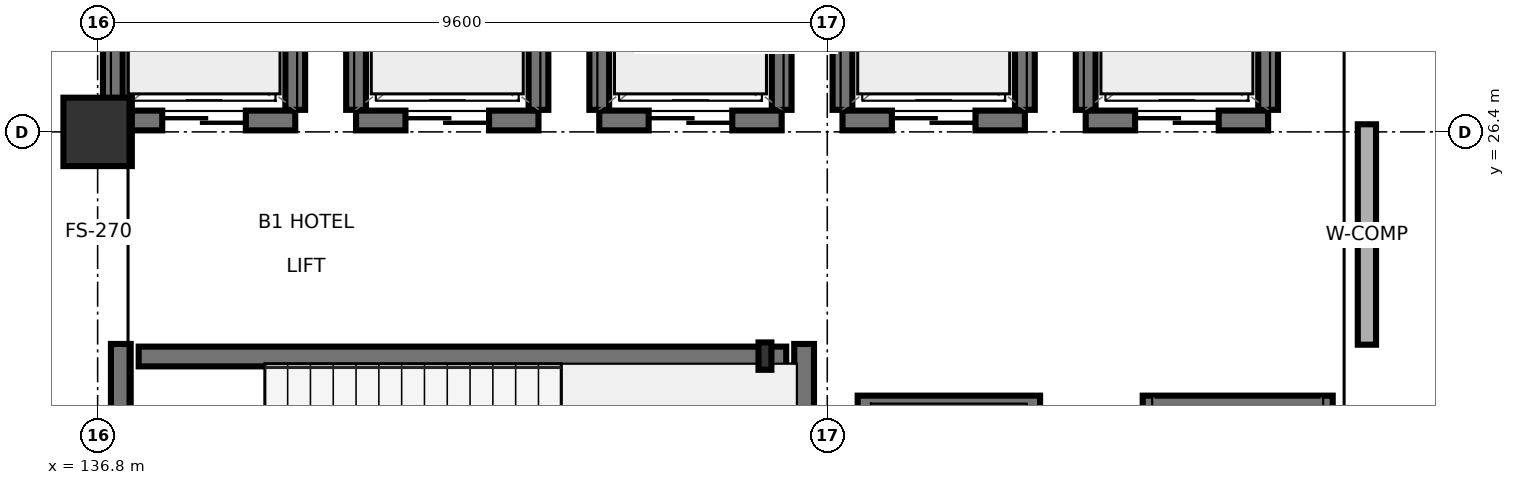
"""IFC4 building model, lengths in metres.
Left out: names, types, materials, properties, quantities, classifications, styles, units other than length and angle.
Written with IfcOpenShell. Run it as: python <this file> out.ifc"""

import sys

from ifc_helpers import new_model, si_unit, direction, frame, frame_2d, origin, origin_2d, place, context, subcontext, project, spatial, rectangle, i_section, extrude, element, fill, save


model = new_model("IFC4")
c1 = context("Model", 3, precision=1e-05, world=origin(), true_north=direction((0.0, 1.0)))
c2 = subcontext(c1, "Body", "Model", "MODEL_VIEW")
j1 = project(units=[si_unit("LENGTHUNIT", "METRE"), si_unit("PLANEANGLEUNIT", "RADIAN")], contexts=[c1])
p1 = place(None, origin())
s1 = spatial("IfcSite", under=j1, at=p1, CompositionType="ELEMENT")
p2 = place(p1, origin())
s2 = spatial("IfcBuilding", under=s1, at=p2, CompositionType="ELEMENT")
p3 = place(p2, frame((0.0, 0.0, -4.2)))
s3 = spatial("IfcBuildingStorey", under=s2, at=p3, CompositionType="ELEMENT", Elevation=-4.2)
p4 = place(p3, frame((136.8, 26.4, 0.0), z_axis=(0.0, 0.0, 1.0), x_axis=(1.0, 0.0, 0.0)))
e1 = element("IfcColumn", 1, at=p4, inside=s3, PredefinedType="COLUMN", context=c2, shape_type="SweptSolid", body=[
    extrude(rectangle(XDim=0.9, YDim=0.9, at=origin_2d()), origin(), (0.0, 0.0, 1.0), 4.2),
])
p5 = place(p3, frame((145.58, 23.45, 0.0), z_axis=(0.0, 0.0, 1.0), x_axis=(1.0, 0.0, 0.0)))
e2 = element("IfcColumn", 2, at=p5, inside=s3, PredefinedType="PILASTER", context=c2, shape_type="SweptSolid", body=[
    extrude(i_section(OverallWidth=0.17, OverallDepth=0.36, WebThickness=0.008, FlangeThickness=0.013, FilletRadius=0.018, at=origin_2d()), origin(), (0.0, 0.0, 1.0), 4.2),
])
p6 = place(p3, frame((137.105, 19.34, 0.0), z_axis=(0.0, 0.0, 1.0), x_axis=(0.0, 1.0, 0.0)))
e3 = element("IfcWall", 3, at=p6, inside=s3, PredefinedType="SHEAR", context=c2, shape_type="SweptSolid", body=[
    extrude(rectangle(XDim=4.27, YDim=0.26, at=frame_2d((2.135, 0.0))), origin(), (0.0, 0.0, 1.0), 3.88),
])
p7 = place(p6, frame((0.61, 0.0, 0.0)))
e4 = element("IfcOpeningElement", 4, at=p7, cuts=e3, PredefinedType="OPENING", context=c2, shape_type="SweptSolid", body=[
    extrude(rectangle(XDim=1.1, YDim=2.2, at=frame_2d((0.55, 1.1))), frame((0.0, 0.14, 0.0), z_axis=(0.0, -1.0, 0.0), x_axis=(1.0, 0.0, 0.0)), (0.0, 0.0, 1.0), 0.28),
])
p8 = place(p3, frame((146.095, 19.34, 0.0), z_axis=(0.0, 0.0, 1.0), x_axis=(0.0, 1.0, 0.0)))
e5 = element("IfcWall", 5, at=p8, inside=s3, PredefinedType="SHEAR", context=c2, shape_type="SweptSolid", body=[
    extrude(rectangle(XDim=4.27, YDim=0.26, at=frame_2d((2.135, 0.0))), origin(), (0.0, 0.0, 1.0), 3.88),
])
p9 = place(p3, frame((137.34, 23.445, 0.0), z_axis=(0.0, 0.0, 1.0), x_axis=(1.0, 0.0, 0.0)))
e6 = element("IfcWall", 6, at=p9, inside=s3, PredefinedType="SHEAR", context=c2, shape_type="SweptSolid", body=[
    extrude(rectangle(XDim=8.52, YDim=0.26, at=frame_2d((4.26, 0.0))), origin(), (0.0, 0.0, 1.0), 3.88),
])
p10 = place(p3, frame((137.0, 26.55, 0.0), z_axis=(0.0, 0.0, 1.0), x_axis=(1.0, 0.0, 0.0)))
e7 = element("IfcWall", 7, at=p10, inside=s3, PredefinedType="SHEAR", context=c2, shape_type="SweptSolid", body=[
    extrude(rectangle(XDim=2.4, YDim=0.26, at=frame_2d((1.2, 0.0))), origin(), (0.0, 0.0, 1.0), 3.315),
])
p11 = place(p10, frame((0.65, 0.0, 0.0)))
e8 = element("IfcOpeningElement", 8, at=p11, cuts=e7, PredefinedType="OPENING", context=c2, shape_type="SweptSolid", body=[
    extrude(rectangle(XDim=1.1, YDim=2.2, at=frame_2d((0.55, 1.1))), frame((0.0, 0.14, 0.0), z_axis=(0.0, -1.0, 0.0), x_axis=(1.0, 0.0, 0.0)), (0.0, 0.0, 1.0), 0.28),
])
for number, where, z_axis, x_axis in (
    (9, (137.0, 26.69, 0.0), (0.0, 0.0, 1.0), (0.0, 1.0, 0.0)),
    (10, (139.4, 26.69, 0.0), (0.0, 0.0, 1.0), (0.0, 1.0, 0.0)),
):
    element("IfcWall", number, at=place(p3, frame(where, z_axis=z_axis, x_axis=x_axis)), inside=s3, PredefinedType="SHEAR", context=c2, shape_type="SweptSolid", body=[
        extrude(rectangle(XDim=1.82, YDim=0.26, at=frame_2d((0.91, 0.0))), origin(), (0.0, 0.0, 1.0), 3.315),
    ])
p12 = place(p3, frame((140.2, 26.55, 0.0), z_axis=(0.0, 0.0, 1.0), x_axis=(1.0, 0.0, 0.0)))
e11 = element("IfcWall", 11, at=p12, inside=s3, PredefinedType="SHEAR", context=c2, shape_type="SweptSolid", body=[
    extrude(rectangle(XDim=2.4, YDim=0.26, at=frame_2d((1.2, 0.0))), origin(), (0.0, 0.0, 1.0), 3.88),
])
p13 = place(p12, frame((0.65, 0.0, 0.0)))
e12 = element("IfcOpeningElement", 12, at=p13, cuts=e11, PredefinedType="OPENING", context=c2, shape_type="SweptSolid", body=[
    extrude(rectangle(XDim=1.1, YDim=2.2, at=frame_2d((0.55, 1.1))), frame((0.0, 0.14, 0.0), z_axis=(0.0, -1.0, 0.0), x_axis=(1.0, 0.0, 0.0)), (0.0, 0.0, 1.0), 0.28),
])
for number, where, z_axis, x_axis in (
    (13, (140.2, 26.69, 0.0), (0.0, 0.0, 1.0), (0.0, 1.0, 0.0)),
    (14, (142.6, 26.69, 0.0), (0.0, 0.0, 1.0), (0.0, 1.0, 0.0)),
):
    element("IfcWall", number, at=place(p3, frame(where, z_axis=z_axis, x_axis=x_axis)), inside=s3, PredefinedType="SHEAR", context=c2, shape_type="SweptSolid", body=[
        extrude(rectangle(XDim=1.82, YDim=0.26, at=frame_2d((0.91, 0.0))), origin(), (0.0, 0.0, 1.0), 3.88),
    ])
p14 = place(p3, frame((143.4, 26.55, 0.0), z_axis=(0.0, 0.0, 1.0), x_axis=(1.0, 0.0, 0.0)))
e15 = element("IfcWall", 15, at=p14, inside=s3, PredefinedType="SHEAR", context=c2, shape_type="SweptSolid", body=[
    extrude(rectangle(XDim=2.4, YDim=0.26, at=frame_2d((1.2, 0.0))), origin(), (0.0, 0.0, 1.0), 3.88),
])
p15 = place(p14, frame((0.65, 0.0, 0.0)))
e16 = element("IfcOpeningElement", 16, at=p15, cuts=e15, PredefinedType="OPENING", context=c2, shape_type="SweptSolid", body=[
    extrude(rectangle(XDim=1.1, YDim=2.2, at=frame_2d((0.55, 1.1))), frame((0.0, 0.14, 0.0), z_axis=(0.0, -1.0, 0.0), x_axis=(1.0, 0.0, 0.0)), (0.0, 0.0, 1.0), 0.28),
])
for number, where, z_axis, x_axis in (
    (17, (143.4, 26.69, 0.0), (0.0, 0.0, 1.0), (0.0, 1.0, 0.0)),
    (18, (145.8, 26.69, 0.0), (0.0, 0.0, 1.0), (0.0, 1.0, 0.0)),
):
    element("IfcWall", number, at=place(p3, frame(where, z_axis=z_axis, x_axis=x_axis)), inside=s3, PredefinedType="SHEAR", context=c2, shape_type="SweptSolid", body=[
        extrude(rectangle(XDim=1.82, YDim=0.26, at=frame_2d((0.91, 0.0))), origin(), (0.0, 0.0, 1.0), 3.88),
    ])
p16 = place(p3, frame((146.6, 26.55, 0.0), z_axis=(0.0, 0.0, 1.0), x_axis=(1.0, 0.0, 0.0)))
e19 = element("IfcWall", 19, at=p16, inside=s3, PredefinedType="SHEAR", context=c2, shape_type="SweptSolid", body=[
    extrude(rectangle(XDim=2.4, YDim=0.26, at=frame_2d((1.2, 0.0))), origin(), (0.0, 0.0, 1.0), 3.88),
])
p17 = place(p16, frame((0.65, 0.0, 0.0)))
e20 = element("IfcOpeningElement", 20, at=p17, cuts=e19, PredefinedType="OPENING", context=c2, shape_type="SweptSolid", body=[
    extrude(rectangle(XDim=1.1, YDim=2.2, at=frame_2d((0.55, 1.1))), frame((0.0, 0.14, 0.0), z_axis=(0.0, -1.0, 0.0), x_axis=(1.0, 0.0, 0.0)), (0.0, 0.0, 1.0), 0.28),
])
for number, where, z_axis, x_axis in (
    (21, (146.6, 26.69, 0.0), (0.0, 0.0, 1.0), (0.0, 1.0, 0.0)),
    (22, (149.0, 26.69, 0.0), (0.0, 0.0, 1.0), (0.0, 1.0, 0.0)),
):
    element("IfcWall", number, at=place(p3, frame(where, z_axis=z_axis, x_axis=x_axis)), inside=s3, PredefinedType="SHEAR", context=c2, shape_type="SweptSolid", body=[
        extrude(rectangle(XDim=1.82, YDim=0.26, at=frame_2d((0.91, 0.0))), origin(), (0.0, 0.0, 1.0), 3.88),
    ])
p18 = place(p3, frame((149.8, 26.55, 0.0), z_axis=(0.0, 0.0, 1.0), x_axis=(1.0, 0.0, 0.0)))
e23 = element("IfcWall", 23, at=p18, inside=s3, PredefinedType="SHEAR", context=c2, shape_type="SweptSolid", body=[
    extrude(rectangle(XDim=2.4, YDim=0.26, at=frame_2d((1.2, 0.0))), origin(), (0.0, 0.0, 1.0), 3.88),
])
p19 = place(p18, frame((0.65, 0.0, 0.0)))
e24 = element("IfcOpeningElement", 24, at=p19, cuts=e23, PredefinedType="OPENING", context=c2, shape_type="SweptSolid", body=[
    extrude(rectangle(XDim=1.1, YDim=2.2, at=frame_2d((0.55, 1.1))), frame((0.0, 0.14, 0.0), z_axis=(0.0, -1.0, 0.0), x_axis=(1.0, 0.0, 0.0)), (0.0, 0.0, 1.0), 0.28),
])
for number, where, z_axis, x_axis in (
    (25, (149.8, 26.69, 0.0), (0.0, 0.0, 1.0), (0.0, 1.0, 0.0)),
    (26, (152.2, 26.69, 0.0), (0.0, 0.0, 1.0), (0.0, 1.0, 0.0)),
):
    element("IfcWall", number, at=place(p3, frame(where, z_axis=z_axis, x_axis=x_axis)), inside=s3, PredefinedType="SHEAR", context=c2, shape_type="SweptSolid", body=[
        extrude(rectangle(XDim=1.82, YDim=0.26, at=frame_2d((0.91, 0.0))), origin(), (0.0, 0.0, 1.0), 3.88),
    ])
p20 = place(p3, frame((146.8, 22.8, 0.0), z_axis=(0.0, 0.0, 1.0), x_axis=(1.0, 0.0, 0.0)))
e27 = element("IfcWall", 27, at=p20, inside=s3, PredefinedType="SHEAR", context=c2, shape_type="SweptSolid", body=[
    extrude(rectangle(XDim=2.4, YDim=0.26, at=frame_2d((1.2, 0.0))), origin(), (0.0, 0.0, 1.0), 3.88),
])
p21 = place(p3, frame((150.55, 22.8, 0.0), z_axis=(0.0, 0.0, 1.0), x_axis=(1.0, 0.0, 0.0)))
e28 = element("IfcWall", 28, at=p21, inside=s3, PredefinedType="SHEAR", context=c2, shape_type="SweptSolid", body=[
    extrude(rectangle(XDim=2.5, YDim=0.26, at=frame_2d((1.25, 0.0))), origin(), (0.0, 0.0, 1.0), 3.88),
])
p22 = place(p3, frame((153.5, 23.6, 0.0), z_axis=(0.0, 0.0, 1.0), x_axis=(0.0, 1.0, 0.0)))
e29 = element("IfcWall", 29, at=p22, inside=s3, PredefinedType="SOLIDWALL", context=c2, shape_type="SweptSolid", body=[
    extrude(rectangle(XDim=2.9, YDim=0.24, at=frame_2d((1.45, 0.0))), origin(), (0.0, 0.0, 1.0), 3.88),
])
p23 = place(p11, origin())
e30 = element("IfcDoor", 30, at=p23, inside=s3, OperationType="SLIDING_TO_LEFT", PredefinedType="DOOR", context=c2, shape_type="SweptSolid", body=[
    extrude(rectangle(XDim=1.1, YDim=2.2, at=frame_2d((0.55, 1.1))), frame((0.0, 0.025, 0.0), z_axis=(0.0, -1.0, 0.0), x_axis=(1.0, 0.0, 0.0)), (0.0, 0.0, 1.0), 0.05),
])
fill(e8, e30)
p24 = place(p13, origin())
e31 = element("IfcDoor", 31, at=p24, inside=s3, OperationType="SLIDING_TO_RIGHT", PredefinedType="DOOR", context=c2, shape_type="SweptSolid", body=[
    extrude(rectangle(XDim=1.1, YDim=2.2, at=frame_2d((0.55, 1.1))), frame((0.0, 0.025, 0.0), z_axis=(0.0, -1.0, 0.0), x_axis=(1.0, 0.0, 0.0)), (0.0, 0.0, 1.0), 0.05),
])
fill(e12, e31)
p25 = place(p15, origin())
e32 = element("IfcDoor", 32, at=p25, inside=s3, OperationType="SLIDING_TO_LEFT", PredefinedType="DOOR", context=c2, shape_type="SweptSolid", body=[
    extrude(rectangle(XDim=1.1, YDim=2.2, at=frame_2d((0.55, 1.1))), frame((0.0, 0.025, 0.0), z_axis=(0.0, -1.0, 0.0), x_axis=(1.0, 0.0, 0.0)), (0.0, 0.0, 1.0), 0.05),
])
fill(e16, e32)
p26 = place(p17, origin())
e33 = element("IfcDoor", 33, at=p26, inside=s3, OperationType="SLIDING_TO_RIGHT", PredefinedType="DOOR", context=c2, shape_type="SweptSolid", body=[
    extrude(rectangle(XDim=1.1, YDim=2.2, at=frame_2d((0.55, 1.1))), frame((0.0, 0.025, 0.0), z_axis=(0.0, -1.0, 0.0), x_axis=(1.0, 0.0, 0.0)), (0.0, 0.0, 1.0), 0.05),
])
fill(e20, e33)
p27 = place(p19, origin())
e34 = element("IfcDoor", 34, at=p27, inside=s3, OperationType="SLIDING_TO_LEFT", PredefinedType="DOOR", context=c2, shape_type="SweptSolid", body=[
    extrude(rectangle(XDim=1.1, YDim=2.2, at=frame_2d((0.55, 1.1))), frame((0.0, 0.025, 0.0), z_axis=(0.0, -1.0, 0.0), x_axis=(1.0, 0.0, 0.0)), (0.0, 0.0, 1.0), 0.05),
])
fill(e24, e34)
save(model, sys.argv[1])
